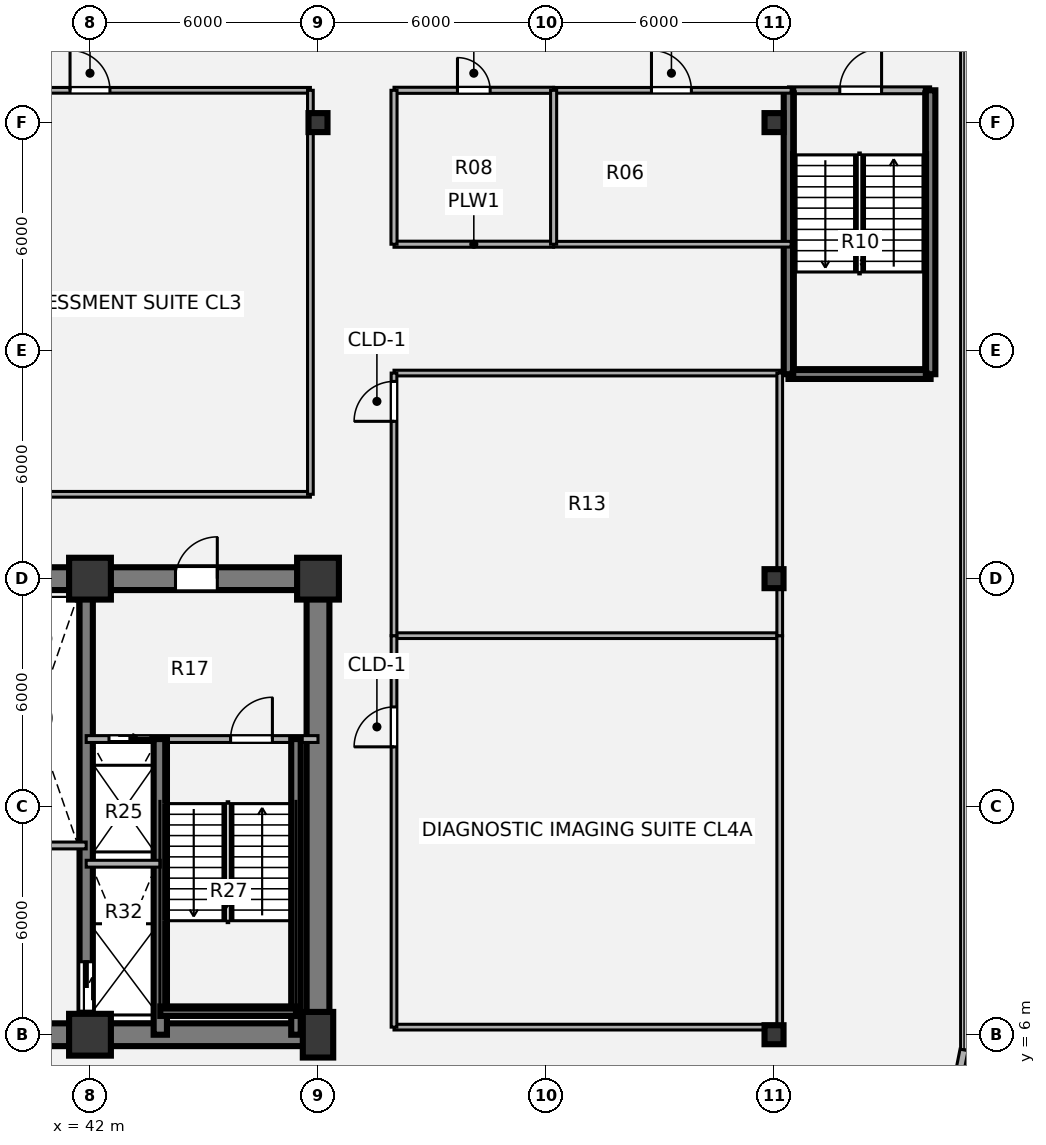
"""IFC4 building model, lengths in metres.
Left out: names, types, materials, properties, quantities, classifications, styles, units other than length and angle.
Written with IfcOpenShell. Run it as: python <this file> out.ifc"""

import sys

from ifc_helpers import new_model, si_unit, direction, frame, frame_2d, origin, origin_2d, place, context, subcontext, project, spatial, rectangle, i_section, extrude, source, transform, mapped, element, fill, save


model = new_model("IFC4")
c1 = context("Model", 3, precision=1e-05, world=origin(), true_north=direction((0.0, 1.0)))
c2 = subcontext(c1, "Body", "Model", "MODEL_VIEW")
j1 = project(units=[si_unit("LENGTHUNIT", "METRE"), si_unit("PLANEANGLEUNIT", "RADIAN")], contexts=[c1])
p1 = place(None, origin())
s1 = spatial("IfcSite", under=j1, at=p1, CompositionType="ELEMENT")
p2 = place(p1, origin())
s2 = spatial("IfcBuilding", under=s1, at=p2, CompositionType="ELEMENT")
p3 = place(p2, frame((0.0, 0.0, 5.4)))
s3 = spatial("IfcBuildingStorey", under=s2, at=p3, CompositionType="ELEMENT", Elevation=5.4)
m1 = source(origin(), c2, "Body", "SweptSolid", [
    extrude(rectangle(XDim=1.1, YDim=1.1, at=origin_2d()), origin(), (0.0, 0.0, 1.0), 4.32),
])
p4 = place(p3, frame((42.0, 6.0, 0.0), z_axis=(0.0, 0.0, 1.0), x_axis=(1.0, 0.0, 0.0)))
e1 = element("IfcColumn", 1, at=p4, inside=s3, PredefinedType="COLUMN", context=c2, shape_type="MappedRepresentation", body=[
    mapped(m1, transform((0.0, 0.0, 0.0), x_axis=(1.0, 0.0, 0.0), y_axis=(0.0, 1.0, 0.0), z_axis=(0.0, 0.0, 1.0), scale=1.0)),
])
m2 = source(origin(), c2, "Body", "SweptSolid", [
    extrude(rectangle(XDim=0.8, YDim=1.2, at=origin_2d()), origin(), (0.0, 0.0, 1.0), 4.32),
])
p5 = place(p3, frame((48.0, 6.0, 0.0), z_axis=(0.0, 0.0, 1.0), x_axis=(1.0, 0.0, 0.0)))
e2 = element("IfcColumn", 2, at=p5, inside=s3, PredefinedType="COLUMN", context=c2, shape_type="MappedRepresentation", body=[
    mapped(m2, transform((0.0, 0.0, 0.0), x_axis=(1.0, 0.0, 0.0), y_axis=(0.0, 1.0, 0.0), z_axis=(0.0, 0.0, 1.0), scale=1.0)),
])
for number, where, z_axis, x_axis in (
    (3, (42.0, 18.0, 0.0), (0.0, 0.0, 1.0), (1.0, 0.0, 0.0)),
    (4, (48.0, 18.0, 0.0), (0.0, 0.0, 1.0), (1.0, 0.0, 0.0)),
):
    element("IfcColumn", number, at=place(p3, frame(where, z_axis=z_axis, x_axis=x_axis)), inside=s3, PredefinedType="COLUMN", context=c2, shape_type="MappedRepresentation", body=[
        mapped(m1, transform((0.0, 0.0, 0.0), x_axis=(1.0, 0.0, 0.0), y_axis=(0.0, 1.0, 0.0), z_axis=(0.0, 0.0, 1.0), scale=1.0)),
    ])
p6 = place(p3, frame((48.3, 6.0, 0.0), z_axis=(0.0, 0.0, 1.0), x_axis=(-1.0, 0.0, 0.0)))
e5 = element("IfcWall", 5, at=p6, inside=s3, PredefinedType="SHEAR", context=c2, shape_type="SweptSolid", body=[
    extrude(rectangle(XDim=24.6, YDim=0.6, at=frame_2d((12.3, 0.0))), origin(), (0.0, 0.0, 1.0), 4.32),
])
p7 = place(p3, frame((48.0, 18.0, 0.0), z_axis=(0.0, 0.0, 1.0), x_axis=(0.0, -1.0, 0.0)))
e6 = element("IfcWall", 6, at=p7, inside=s3, PredefinedType="SHEAR", context=c2, shape_type="SweptSolid", body=[
    extrude(rectangle(XDim=12.0, YDim=0.6, at=frame_2d((6.0, 0.0))), origin(), (0.0, 0.0, 1.0), 4.32),
])
p8 = place(p3, frame((38.8, 18.0, 0.0), z_axis=(0.0, 0.0, 1.0), x_axis=(1.0, 0.0, 0.0)))
e7 = element("IfcWall", 7, at=p8, inside=s3, PredefinedType="SHEAR", context=c2, shape_type="SweptSolid", body=[
    extrude(rectangle(XDim=9.5, YDim=0.6, at=frame_2d((4.75, 0.0))), origin(), (0.0, 0.0, 1.0), 4.32),
])
p9 = place(p8, frame((5.45, 0.0, 0.0)))
e8 = element("IfcOpeningElement", 8, at=p9, cuts=e7, PredefinedType="OPENING", context=c2, shape_type="SweptSolid", body=[
    extrude(rectangle(XDim=1.1, YDim=2.1, at=origin_2d()), frame((0.55, 0.31, 1.05), z_axis=(0.0, -1.0, 0.0), x_axis=(1.0, 0.0, 0.0)), (0.0, 0.0, 1.0), 0.62),
])
p10 = place(p3, frame((41.9, 18.0, 0.0), z_axis=(0.0, 0.0, 1.0), x_axis=(0.0, -1.0, 0.0)))
e9 = element("IfcWall", 9, at=p10, inside=s3, PredefinedType="SHEAR", context=c2, shape_type="SweptSolid", body=[
    extrude(rectangle(XDim=12.0, YDim=0.35, at=frame_2d((6.0, 0.0))), origin(), (0.0, 0.0, 1.0), 4.32),
])
p11 = place(p10, frame((10.08, 0.0, 0.0)))
e10 = element("IfcOpeningElement", 10, at=p11, cuts=e9, PredefinedType="OPENING", context=c2, shape_type="SweptSolid", body=[
    extrude(rectangle(XDim=1.3, YDim=2.1, at=origin_2d()), frame((0.65, 0.185, 1.05), z_axis=(0.0, -1.0, 0.0), x_axis=(1.0, 0.0, 0.0)), (0.0, 0.0, 1.0), 0.37),
])
m3 = source(origin(), c2, "Body", "SweptSolid", [
    extrude(i_section(OverallWidth=0.5, OverallDepth=0.5, WebThickness=0.028, FlangeThickness=0.045, at=origin_2d()), origin(), (0.0, 0.0, 1.0), 4.32),
])
for number, where, z_axis, x_axis in (
    (11, (60.0, 6.0, 0.0), (0.0, 0.0, 1.0), (1.0, 0.0, 0.0)),
    (12, (60.0, 18.0, 0.0), (0.0, 0.0, 1.0), (1.0, 0.0, 0.0)),
    (13, (48.0, 30.0, 0.0), (0.0, 0.0, 1.0), (1.0, 0.0, 0.0)),
    (14, (60.0, 30.0, 0.0), (0.0, 0.0, 1.0), (1.0, 0.0, 0.0)),
):
    element("IfcColumn", number, at=place(p3, frame(where, z_axis=z_axis, x_axis=x_axis)), inside=s3, PredefinedType="COLUMN", context=c2, shape_type="MappedRepresentation", body=[
        mapped(m3, transform((0.0, 0.0, 0.0), x_axis=(1.0, 0.0, 0.0), y_axis=(0.0, 1.0, 0.0), z_axis=(0.0, 0.0, 1.0), scale=1.0)),
    ])
p12 = place(p3, frame((65.0, 5.6, 0.0), z_axis=(0.0, 0.0, 1.0), x_axis=(-0.195138390419, -0.980775717779, 0.0)))
e15 = element("IfcWall", 15, at=p12, inside=s3, PredefinedType="SOLIDWALL", context=c2, shape_type="SweptSolid", body=[
    extrude(rectangle(XDim=1.249, YDim=0.215, at=frame_2d((0.624, 0.0))), origin(), (0.0, 0.0, 1.0), 4.04),
])
p13 = place(p3, frame((60.38, 30.85, 0.0), z_axis=(0.0, 0.0, 1.0), x_axis=(1.0, 0.0, 0.0)))
e16 = element("IfcWall", 16, at=p13, inside=s3, PredefinedType="PARTITIONING", context=c2, shape_type="SweptSolid", body=[
    extrude(rectangle(XDim=3.74, YDim=0.18, at=frame_2d((1.87, 0.0))), origin(), (0.0, 0.0, 1.0), 4.04),
])
p14 = place(p13, frame((1.35, 0.0, 0.0)))
e17 = element("IfcOpeningElement", 17, at=p14, cuts=e16, PredefinedType="OPENING", context=c2, shape_type="SweptSolid", body=[
    extrude(rectangle(XDim=1.1, YDim=2.1, at=origin_2d()), frame((0.55, 0.1, 1.05), z_axis=(0.0, -1.0, 0.0), x_axis=(1.0, 0.0, 0.0)), (0.0, 0.0, 1.0), 0.2),
])
p15 = place(p3, frame((60.38, 23.38, 0.0), z_axis=(0.0, 0.0, 1.0), x_axis=(1.0, 0.0, 0.0)))
e18 = element("IfcWall", 18, at=p15, inside=s3, PredefinedType="SHEAR", context=c2, shape_type="SweptSolid", body=[
    extrude(rectangle(XDim=3.74, YDim=0.25, at=frame_2d((1.87, 0.0))), origin(), (0.0, 0.0, 1.0), 4.32),
])
for number, where, z_axis, x_axis in (
    (19, (60.38, 23.38, 0.0), (0.0, 0.0, 1.0), (0.0, 1.0, 0.0)),
    (20, (64.12, 23.38, 0.0), (0.0, 0.0, 1.0), (0.0, 1.0, 0.0)),
):
    element("IfcWall", number, at=place(p3, frame(where, z_axis=z_axis, x_axis=x_axis)), inside=s3, PredefinedType="SHEAR", context=c2, shape_type="SweptSolid", body=[
        extrude(rectangle(XDim=7.47, YDim=0.25, at=frame_2d((3.735, 0.0))), origin(), (0.0, 0.0, 1.0), 4.32),
    ])
p16 = place(p3, frame((39.35, 10.98, 0.0), z_axis=(0.0, 0.0, 1.0), x_axis=(1.0, 0.0, 0.0)))
e21 = element("IfcWall", 21, at=p16, inside=s3, PredefinedType="PARTITIONING", context=c2, shape_type="SweptSolid", body=[
    extrude(rectangle(XDim=2.55, YDim=0.18, at=frame_2d((1.275, 0.0))), origin(), (0.0, 0.0, 1.0), 4.01),
])
p17 = place(p3, frame((41.9, 13.78, 0.0), z_axis=(0.0, 0.0, 1.0), x_axis=(1.0, 0.0, 0.0)))
e22 = element("IfcWall", 22, at=p17, inside=s3, PredefinedType="PARTITIONING", context=c2, shape_type="SweptSolid", body=[
    extrude(rectangle(XDim=6.1, YDim=0.18, at=frame_2d((3.05, 0.0))), origin(), (0.0, 0.0, 1.0), 4.01),
])
p18 = place(p17, frame((0.6, 0.0, 0.0)))
e23 = element("IfcOpeningElement", 23, at=p18, cuts=e22, PredefinedType="OPENING", context=c2, shape_type="SweptSolid", body=[
    extrude(rectangle(XDim=1.1, YDim=2.1, at=origin_2d()), frame((0.55, 0.1, 1.05), z_axis=(0.0, -1.0, 0.0), x_axis=(1.0, 0.0, 0.0)), (0.0, 0.0, 1.0), 0.2),
])
p19 = place(p17, frame((3.8, 0.0, 0.0)))
e24 = element("IfcOpeningElement", 24, at=p19, cuts=e22, PredefinedType="OPENING", context=c2, shape_type="SweptSolid", body=[
    extrude(rectangle(XDim=1.1, YDim=2.1, at=origin_2d()), frame((0.55, 0.1, 1.05), z_axis=(0.0, -1.0, 0.0), x_axis=(1.0, 0.0, 0.0)), (0.0, 0.0, 1.0), 0.2),
])
p20 = place(p3, frame((43.85, 6.0, 0.0), z_axis=(0.0, 0.0, 1.0), x_axis=(0.0, 1.0, 0.0)))
e25 = element("IfcWall", 25, at=p20, inside=s3, PredefinedType="SHEAR", context=c2, shape_type="SweptSolid", body=[
    extrude(rectangle(XDim=7.78, YDim=0.35, at=frame_2d((3.89, 0.0))), origin(), (0.0, 0.0, 1.0), 4.36),
])
p21 = place(p3, frame((47.42, 6.0, 0.0), z_axis=(0.0, 0.0, 1.0), x_axis=(0.0, 1.0, 0.0)))
e26 = element("IfcWall", 26, at=p21, inside=s3, PredefinedType="SHEAR", context=c2, shape_type="SweptSolid", body=[
    extrude(rectangle(XDim=7.78, YDim=0.25, at=frame_2d((3.89, 0.0))), origin(), (0.0, 0.0, 1.0), 4.36),
])
p22 = place(p3, frame((43.85, 6.62, 0.0), z_axis=(0.0, 0.0, 1.0), x_axis=(1.0, 0.0, 0.0)))
e27 = element("IfcWall", 27, at=p22, inside=s3, PredefinedType="SHEAR", context=c2, shape_type="SweptSolid", body=[
    extrude(rectangle(XDim=3.57, YDim=0.25, at=frame_2d((1.785, 0.0))), origin(), (0.0, 0.0, 1.0), 4.36),
])
p23 = place(p3, frame((41.9, 10.5, 0.0), z_axis=(0.0, 0.0, 1.0), x_axis=(1.0, 0.0, 0.0)))
e28 = element("IfcWall", 28, at=p23, inside=s3, PredefinedType="PARTITIONING", context=c2, shape_type="SweptSolid", body=[
    extrude(rectangle(XDim=1.95, YDim=0.18, at=frame_2d((0.975, 0.0))), origin(), (0.0, 0.0, 1.0), 4.01),
])
p24 = place(p3, frame((50.0, 6.2, 0.0), z_axis=(0.0, 0.0, 1.0), x_axis=(1.0, 0.0, 0.0)))
e29 = element("IfcWall", 29, at=p24, inside=s3, PredefinedType="PARTITIONING", context=c2, shape_type="SweptSolid", body=[
    extrude(rectangle(XDim=10.15, YDim=0.15, at=frame_2d((5.075, 0.0))), origin(), (0.0, 0.0, 1.0), 3.125),
])
p25 = place(p3, frame((50.0, 16.5, 0.0), z_axis=(0.0, 0.0, 1.0), x_axis=(1.0, 0.0, 0.0)))
e30 = element("IfcWall", 30, at=p25, inside=s3, PredefinedType="PARTITIONING", context=c2, shape_type="SweptSolid", body=[
    extrude(rectangle(XDim=10.15, YDim=0.15, at=frame_2d((5.075, 0.0))), origin(), (0.0, 0.0, 1.0), 4.01),
])
p26 = place(p3, frame((36.0, 20.22, 0.0), z_axis=(0.0, 0.0, 1.0), x_axis=(1.0, 0.0, 0.0)))
e31 = element("IfcWall", 31, at=p26, inside=s3, PredefinedType="PARTITIONING", context=c2, shape_type="SweptSolid", body=[
    extrude(rectangle(XDim=11.8, YDim=0.15, at=frame_2d((5.9, 0.0))), origin(), (0.0, 0.0, 1.0), 4.01),
])
p27 = place(p3, frame((50.0, 23.41, 0.0), z_axis=(0.0, 0.0, 1.0), x_axis=(1.0, 0.0, 0.0)))
e32 = element("IfcWall", 32, at=p27, inside=s3, PredefinedType="PARTITIONING", context=c2, shape_type="SweptSolid", body=[
    extrude(rectangle(XDim=10.15, YDim=0.15, at=frame_2d((5.075, 0.0))), origin(), (0.0, 0.0, 1.0), 4.01),
])
p28 = place(p3, frame((50.0, 26.8, 0.0), z_axis=(0.0, 0.0, 1.0), x_axis=(1.0, 0.0, 0.0)))
e33 = element("IfcWall", 33, at=p28, inside=s3, PredefinedType="PLUMBINGWALL", context=c2, shape_type="SweptSolid", body=[
    extrude(rectangle(XDim=4.2, YDim=0.16, at=frame_2d((2.1, 0.0))), origin(), (0.0, 0.0, 1.0), 4.01),
])
p29 = place(p3, frame((54.2, 26.8, 0.0), z_axis=(0.0, 0.0, 1.0), x_axis=(1.0, 0.0, 0.0)))
e34 = element("IfcWall", 34, at=p29, inside=s3, PredefinedType="PARTITIONING", context=c2, shape_type="SweptSolid", body=[
    extrude(rectangle(XDim=6.25, YDim=0.15, at=frame_2d((3.125, 0.0))), origin(), (0.0, 0.0, 1.0), 4.01),
])
p30 = place(p3, frame((36.0, 30.85, 0.0), z_axis=(0.0, 0.0, 1.0), x_axis=(1.0, 0.0, 0.0)))
e35 = element("IfcWall", 35, at=p30, inside=s3, PredefinedType="PARTITIONING", context=c2, shape_type="SweptSolid", body=[
    extrude(rectangle(XDim=11.8, YDim=0.15, at=frame_2d((5.9, 0.0))), origin(), (0.0, 0.0, 1.0), 4.01),
])
p31 = place(p30, frame((5.475, 0.0, 0.0)))
e36 = element("IfcOpeningElement", 36, at=p31, cuts=e35, PredefinedType="OPENING", context=c2, shape_type="SweptSolid", body=[
    extrude(rectangle(XDim=1.05, YDim=2.1, at=origin_2d()), frame((0.525, 0.085, 1.05), z_axis=(0.0, -1.0, 0.0), x_axis=(1.0, 0.0, 0.0)), (0.0, 0.0, 1.0), 0.17),
])
p32 = place(p3, frame((50.0, 30.85, 0.0), z_axis=(0.0, 0.0, 1.0), x_axis=(1.0, 0.0, 0.0)))
e37 = element("IfcWall", 37, at=p32, inside=s3, PredefinedType="PLUMBINGWALL", context=c2, shape_type="SweptSolid", body=[
    extrude(rectangle(XDim=4.2, YDim=0.16, at=frame_2d((2.1, 0.0))), origin(), (0.0, 0.0, 1.0), 4.01),
])
p33 = place(p32, frame((1.67, 0.0, 0.0)))
e38 = element("IfcOpeningElement", 38, at=p33, cuts=e37, PredefinedType="OPENING", context=c2, shape_type="SweptSolid", body=[
    extrude(rectangle(XDim=0.86, YDim=2.1, at=origin_2d()), frame((0.43, 0.09, 1.05), z_axis=(0.0, -1.0, 0.0), x_axis=(1.0, 0.0, 0.0)), (0.0, 0.0, 1.0), 0.18),
])
p34 = place(p3, frame((54.2, 30.85, 0.0), z_axis=(0.0, 0.0, 1.0), x_axis=(1.0, 0.0, 0.0)))
e39 = element("IfcWall", 39, at=p34, inside=s3, PredefinedType="PARTITIONING", context=c2, shape_type="SweptSolid", body=[
    extrude(rectangle(XDim=6.25, YDim=0.15, at=frame_2d((3.125, 0.0))), origin(), (0.0, 0.0, 1.0), 4.01),
])
p35 = place(p34, frame((2.575, 0.0, 0.0)))
e40 = element("IfcOpeningElement", 40, at=p35, cuts=e39, PredefinedType="OPENING", context=c2, shape_type="SweptSolid", body=[
    extrude(rectangle(XDim=1.05, YDim=2.1, at=origin_2d()), frame((0.525, 0.085, 1.05), z_axis=(0.0, -1.0, 0.0), x_axis=(1.0, 0.0, 0.0)), (0.0, 0.0, 1.0), 0.17),
])
p36 = place(p3, frame((47.8, 20.22, 0.0), z_axis=(0.0, 0.0, 1.0), x_axis=(0.0, 1.0, 0.0)))
e41 = element("IfcWall", 41, at=p36, inside=s3, PredefinedType="PARTITIONING", context=c2, shape_type="SweptSolid", body=[
    extrude(rectangle(XDim=10.63, YDim=0.15, at=frame_2d((5.315, 0.0))), origin(), (0.0, 0.0, 1.0), 3.225),
])
p37 = place(p3, frame((50.0, 6.2, 0.0), z_axis=(0.0, 0.0, 1.0), x_axis=(0.0, 1.0, 0.0)))
e42 = element("IfcWall", 42, at=p37, inside=s3, PredefinedType="PARTITIONING", context=c2, shape_type="SweptSolid", body=[
    extrude(rectangle(XDim=10.3, YDim=0.15, at=frame_2d((5.15, 0.0))), origin(), (0.0, 0.0, 1.0), 3.718),
])
p38 = place(p37, frame((7.375, 0.0, 0.0)))
e43 = element("IfcOpeningElement", 43, at=p38, cuts=e42, PredefinedType="OPENING", context=c2, shape_type="SweptSolid", body=[
    extrude(rectangle(XDim=1.05, YDim=2.1, at=origin_2d()), frame((0.525, 0.085, 1.05), z_axis=(0.0, -1.0, 0.0), x_axis=(1.0, 0.0, 0.0)), (0.0, 0.0, 1.0), 0.17),
])
p39 = place(p3, frame((50.0, 16.5, 0.0), z_axis=(0.0, 0.0, 1.0), x_axis=(0.0, 1.0, 0.0)))
e44 = element("IfcWall", 44, at=p39, inside=s3, PredefinedType="PARTITIONING", context=c2, shape_type="SweptSolid", body=[
    extrude(rectangle(XDim=6.91, YDim=0.15, at=frame_2d((3.455, 0.0))), origin(), (0.0, 0.0, 1.0), 3.718),
])
p40 = place(p39, frame((5.64, 0.0, 0.0)))
e45 = element("IfcOpeningElement", 45, at=p40, cuts=e44, PredefinedType="OPENING", context=c2, shape_type="SweptSolid", body=[
    extrude(rectangle(XDim=1.05, YDim=2.1, at=origin_2d()), frame((0.525, 0.085, 1.05), z_axis=(0.0, -1.0, 0.0), x_axis=(1.0, 0.0, 0.0)), (0.0, 0.0, 1.0), 0.17),
])
for number, where, z_axis, x_axis in (
    (46, (50.0, 26.8, 0.0), (0.0, 0.0, 1.0), (0.0, 1.0, 0.0)),
    (47, (54.2, 26.8, 0.0), (0.0, 0.0, 1.0), (0.0, 1.0, 0.0)),
):
    element("IfcWall", number, at=place(p3, frame(where, z_axis=z_axis, x_axis=x_axis)), inside=s3, PredefinedType="PLUMBINGWALL", context=c2, shape_type="SweptSolid", body=[
        extrude(rectangle(XDim=4.05, YDim=0.16, at=frame_2d((2.025, 0.0))), origin(), (0.0, 0.0, 1.0), 3.666),
    ])
p41 = place(p3, frame((60.15, 6.2, 0.0), z_axis=(0.0, 0.0, 1.0), x_axis=(0.0, 1.0, 0.0)))
e48 = element("IfcWall", 48, at=p41, inside=s3, PredefinedType="PARTITIONING", context=c2, shape_type="SweptSolid", body=[
    extrude(rectangle(XDim=10.3, YDim=0.15, at=frame_2d((5.15, 0.0))), origin(), (0.0, 0.0, 1.0), 3.225),
])
p42 = place(p3, frame((60.15, 16.5, 0.0), z_axis=(0.0, 0.0, 1.0), x_axis=(0.0, 1.0, 0.0)))
e49 = element("IfcWall", 49, at=p42, inside=s3, PredefinedType="PARTITIONING", context=c2, shape_type="SweptSolid", body=[
    extrude(rectangle(XDim=6.91, YDim=0.15, at=frame_2d((3.455, 0.0))), origin(), (0.0, 0.0, 1.0), 3.225),
])
m4 = source(origin(), c2, "Body", "SweptSolid", [
    extrude(rectangle(XDim=1.1, YDim=2.1, at=origin_2d()), frame((0.55, 0.025, 1.05), z_axis=(0.0, -1.0, 0.0), x_axis=(1.0, 0.0, 0.0)), (0.0, 0.0, 1.0), 0.05),
])
p43 = place(p14, origin())
e50 = element("IfcDoor", 50, at=p43, inside=s3, OperationType="SINGLE_SWING_RIGHT", PredefinedType="DOOR", context=c2, shape_type="MappedRepresentation", body=[
    mapped(m4, transform((0.0, 0.0, 0.0), x_axis=(1.0, 0.0, 0.0), y_axis=(0.0, 1.0, 0.0), z_axis=(0.0, 0.0, 1.0), scale=1.0)),
])
fill(e17, e50)
m5 = source(origin(), c2, "Body", "SweptSolid", [
    extrude(rectangle(XDim=1.1, YDim=2.1, at=origin_2d()), frame((0.55, 0.025, 1.05), z_axis=(0.0, -1.0, 0.0), x_axis=(1.0, 0.0, 0.0)), (0.0, 0.0, 1.0), 0.05),
])
p44 = place(p18, origin())
e51 = element("IfcDoor", 51, at=p44, inside=s3, OperationType="SLIDING_TO_RIGHT", PredefinedType="DOOR", context=c2, shape_type="MappedRepresentation", body=[
    mapped(m5, transform((0.0, 0.0, 0.0), x_axis=(1.0, 0.0, 0.0), y_axis=(0.0, 1.0, 0.0), z_axis=(0.0, 0.0, 1.0), scale=1.0)),
])
fill(e23, e51)
p45 = place(p19, origin())
e52 = element("IfcDoor", 52, at=p45, inside=s3, OperationType="SINGLE_SWING_RIGHT", PredefinedType="DOOR", context=c2, shape_type="MappedRepresentation", body=[
    mapped(m4, transform((0.0, 0.0, 0.0), x_axis=(1.0, 0.0, 0.0), y_axis=(0.0, 1.0, 0.0), z_axis=(0.0, 0.0, 1.0), scale=1.0)),
])
fill(e24, e52)
m6 = source(origin(), c2, "Body", "SweptSolid", [
    extrude(rectangle(XDim=1.3, YDim=2.1, at=origin_2d()), frame((0.65, 0.025, 1.05), z_axis=(0.0, -1.0, 0.0), x_axis=(1.0, 0.0, 0.0)), (0.0, 0.0, 1.0), 0.05),
])
p46 = place(p11, origin())
e53 = element("IfcDoor", 53, at=p46, inside=s3, OperationType="SLIDING_TO_LEFT", PredefinedType="DOOR", context=c2, shape_type="MappedRepresentation", body=[
    mapped(m6, transform((0.0, 0.0, 0.0), x_axis=(1.0, 0.0, 0.0), y_axis=(0.0, 1.0, 0.0), z_axis=(0.0, 0.0, 1.0), scale=1.0)),
])
fill(e10, e53)
m7 = source(origin(), c2, "Body", "SweptSolid", [
    extrude(rectangle(XDim=1.1, YDim=2.1, at=origin_2d()), frame((0.55, 0.025, 1.05), z_axis=(0.0, -1.0, 0.0), x_axis=(1.0, 0.0, 0.0)), (0.0, 0.0, 1.0), 0.05),
])
p47 = place(p9, origin())
e54 = element("IfcDoor", 54, at=p47, inside=s3, OperationType="SINGLE_SWING_RIGHT", PredefinedType="DOOR", context=c2, shape_type="MappedRepresentation", body=[
    mapped(m7, transform((0.0, 0.0, 0.0), x_axis=(1.0, 0.0, 0.0), y_axis=(0.0, 1.0, 0.0), z_axis=(0.0, 0.0, 1.0), scale=1.0)),
])
fill(e8, e54)
m8 = source(origin(), c2, "Body", "SweptSolid", [
    extrude(rectangle(XDim=1.05, YDim=2.1, at=origin_2d()), frame((0.525, 0.025, 1.05), z_axis=(0.0, -1.0, 0.0), x_axis=(1.0, 0.0, 0.0)), (0.0, 0.0, 1.0), 0.05),
])
p48 = place(p31, origin())
e55 = element("IfcDoor", 55, at=p48, inside=s3, OperationType="SINGLE_SWING_LEFT", PredefinedType="DOOR", context=c2, shape_type="MappedRepresentation", body=[
    mapped(m8, transform((0.0, 0.0, 0.0), x_axis=(1.0, 0.0, 0.0), y_axis=(0.0, 1.0, 0.0), z_axis=(0.0, 0.0, 1.0), scale=1.0)),
])
fill(e36, e55)
m9 = source(origin(), c2, "Body", "SweptSolid", [
    extrude(rectangle(XDim=0.86, YDim=2.1, at=origin_2d()), frame((0.43, 0.025, 1.05), z_axis=(0.0, -1.0, 0.0), x_axis=(1.0, 0.0, 0.0)), (0.0, 0.0, 1.0), 0.05),
])
p49 = place(p33, origin())
e56 = element("IfcDoor", 56, at=p49, inside=s3, OperationType="SINGLE_SWING_LEFT", PredefinedType="DOOR", context=c2, shape_type="MappedRepresentation", body=[
    mapped(m9, transform((0.0, 0.0, 0.0), x_axis=(1.0, 0.0, 0.0), y_axis=(0.0, 1.0, 0.0), z_axis=(0.0, 0.0, 1.0), scale=1.0)),
])
fill(e38, e56)
p50 = place(p35, origin())
e57 = element("IfcDoor", 57, at=p50, inside=s3, OperationType="SINGLE_SWING_LEFT", PredefinedType="DOOR", context=c2, shape_type="MappedRepresentation", body=[
    mapped(m8, transform((0.0, 0.0, 0.0), x_axis=(1.0, 0.0, 0.0), y_axis=(0.0, 1.0, 0.0), z_axis=(0.0, 0.0, 1.0), scale=1.0)),
])
fill(e40, e57)
p51 = place(p38, origin())
e58 = element("IfcDoor", 58, at=p51, inside=s3, OperationType="SINGLE_SWING_LEFT", PredefinedType="DOOR", context=c2, shape_type="MappedRepresentation", body=[
    mapped(m8, transform((0.0, 0.0, 0.0), x_axis=(1.0, 0.0, 0.0), y_axis=(0.0, 1.0, 0.0), z_axis=(0.0, 0.0, 1.0), scale=1.0)),
])
fill(e43, e58)
p52 = place(p40, origin())
e59 = element("IfcDoor", 59, at=p52, inside=s3, OperationType="SINGLE_SWING_LEFT", PredefinedType="DOOR", context=c2, shape_type="MappedRepresentation", body=[
    mapped(m8, transform((0.0, 0.0, 0.0), x_axis=(1.0, 0.0, 0.0), y_axis=(0.0, 1.0, 0.0), z_axis=(0.0, 0.0, 1.0), scale=1.0)),
])
fill(e45, e59)
save(model, sys.argv[1])
